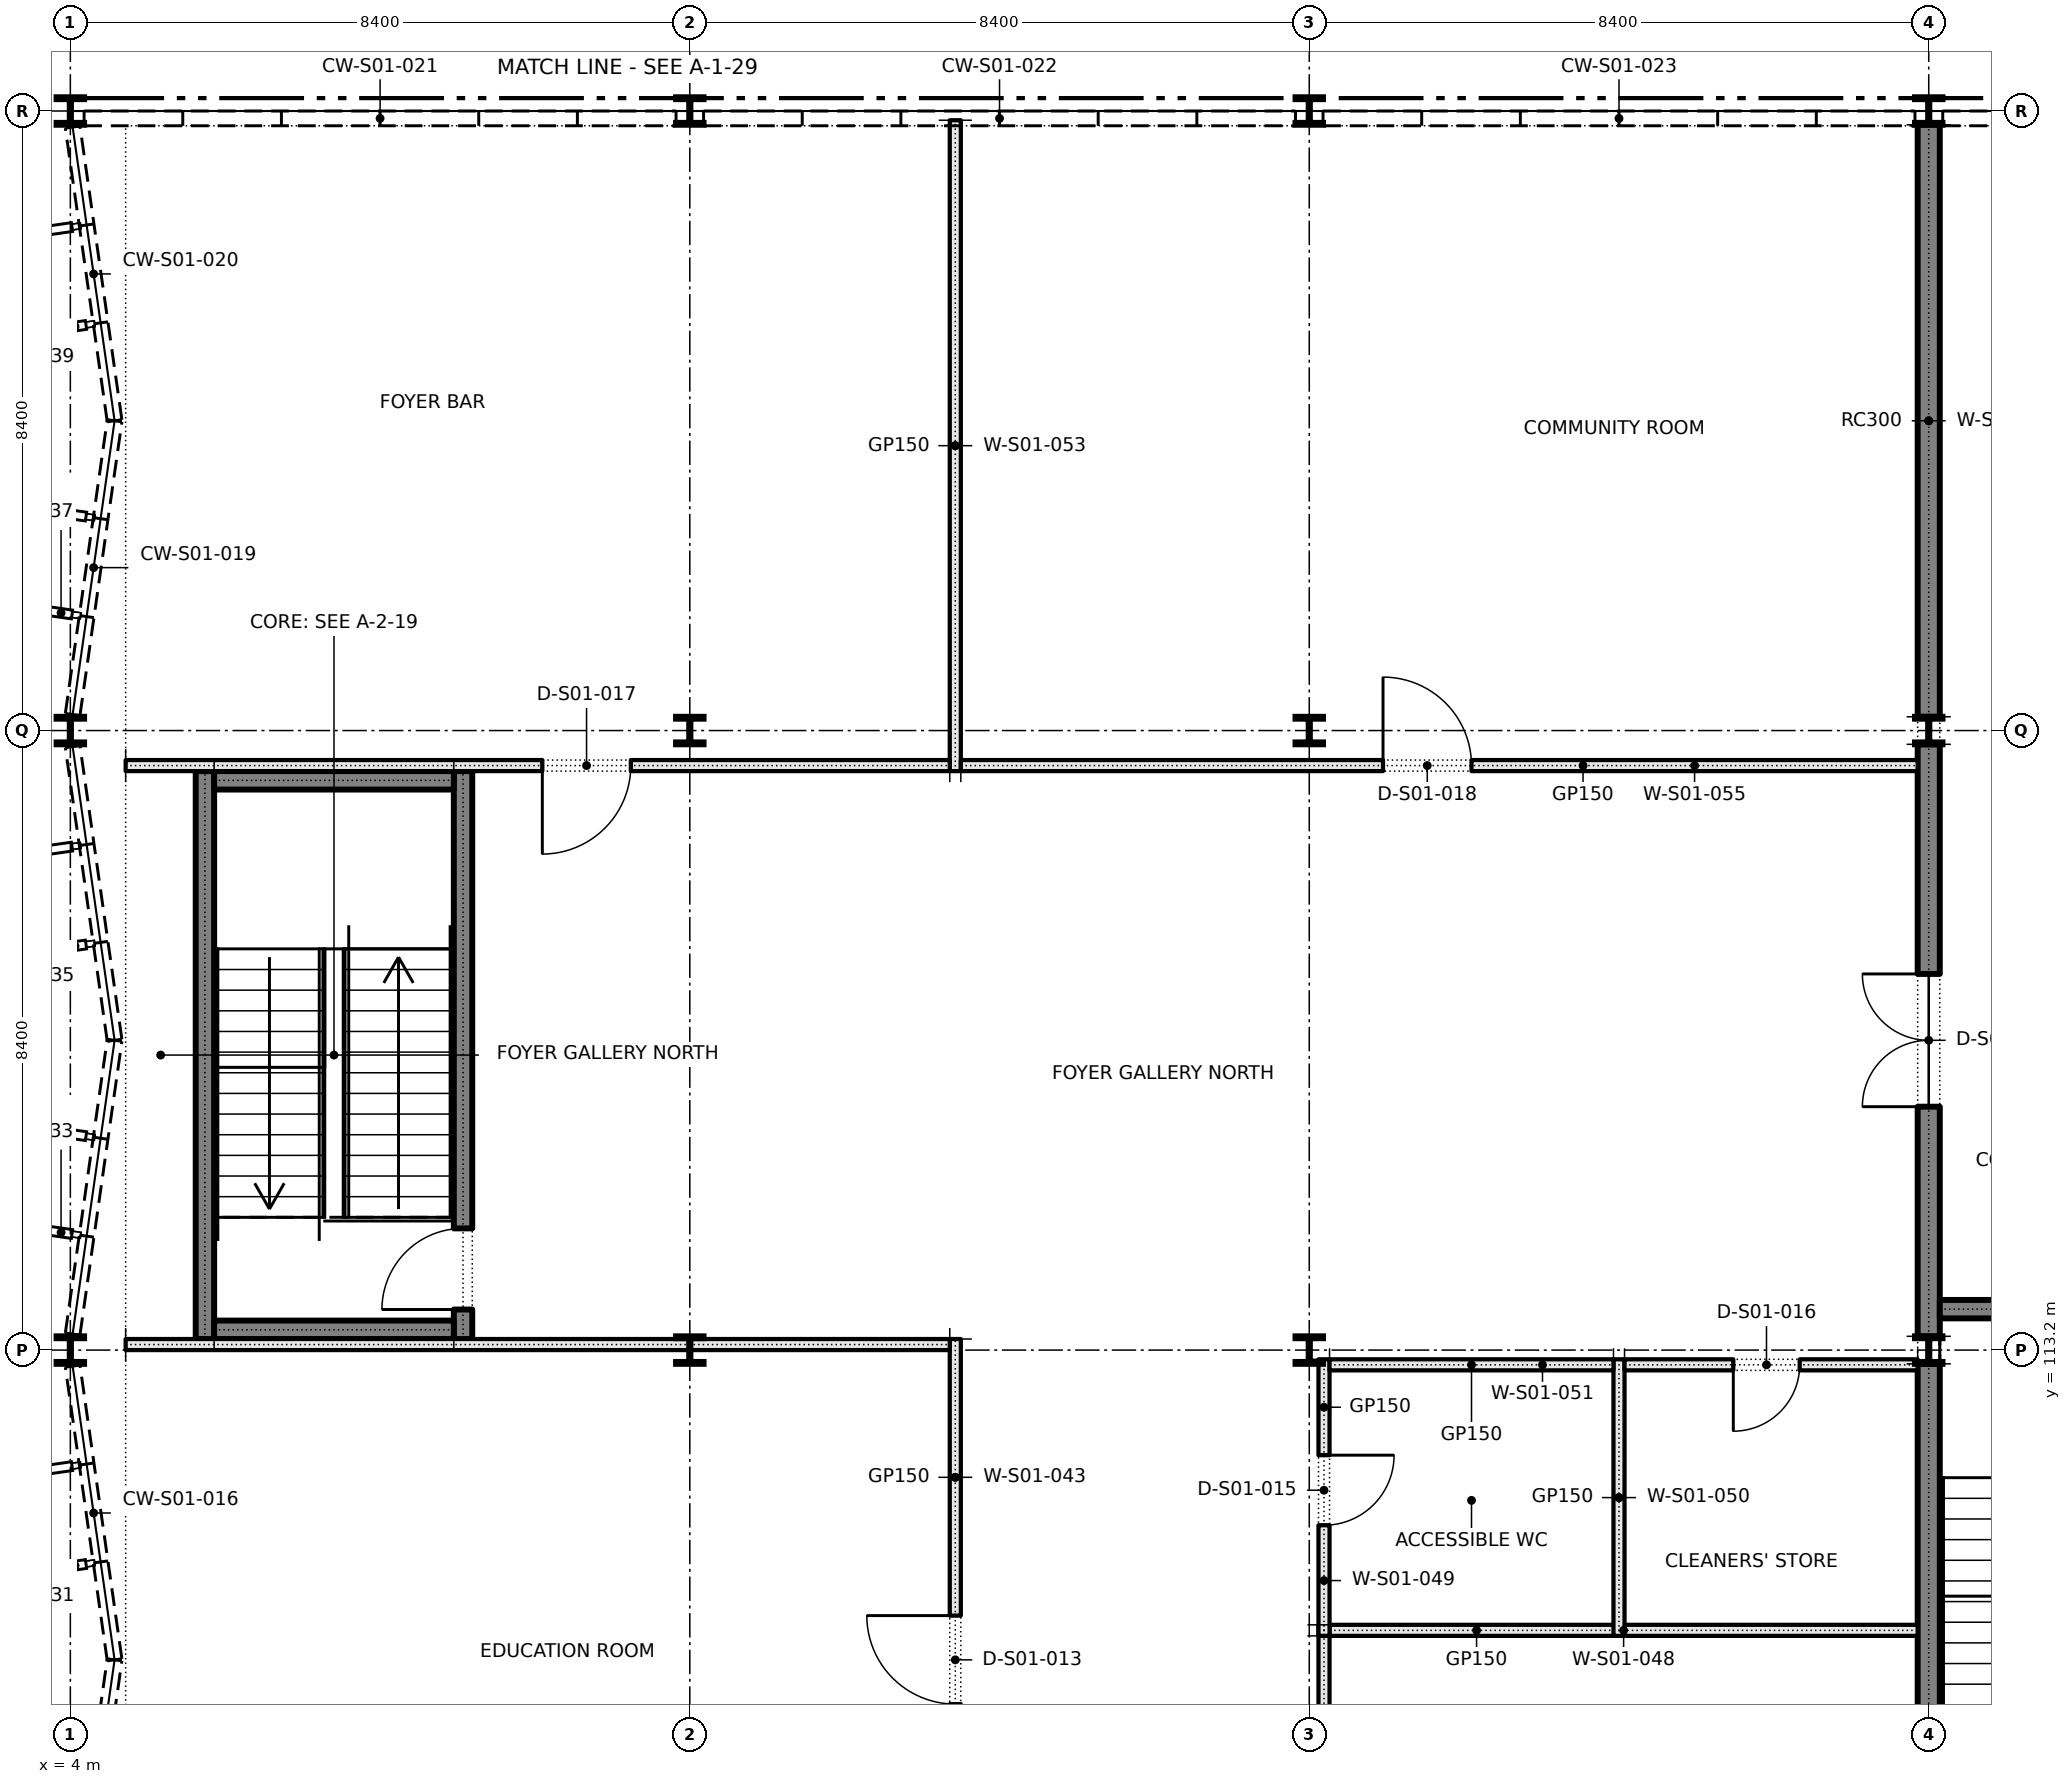
"""IFC4 building model, lengths in metres.
Left out: names, types, materials, properties, quantities, classifications, styles, units other than length and angle.
Written with IfcOpenShell. Run it as: python <this file> out.ifc"""

import sys

from ifc_helpers import new_model, si_unit, direction, frame, frame_2d, origin, origin_2d, place, context, subcontext, project, spatial, rectangle, i_section, extrude, element, fill, save


model = new_model("IFC4")
c1 = context("Model", 3, precision=1e-05, world=origin(), true_north=direction((0.0, 1.0)))
c2 = subcontext(c1, "Body", "Model", "MODEL_VIEW")
j1 = project(units=[si_unit("LENGTHUNIT", "METRE"), si_unit("PLANEANGLEUNIT", "RADIAN")], contexts=[c1])
p1 = place(None, origin())
s1 = spatial("IfcSite", under=j1, at=p1, CompositionType="ELEMENT")
p2 = place(p1, origin())
s2 = spatial("IfcBuilding", under=s1, at=p2, CompositionType="ELEMENT")
p3 = place(p2, frame((0.0, 0.0, 5.4)))
s3 = spatial("IfcBuildingStorey", under=s2, at=p3, CompositionType="ELEMENT", Elevation=5.4)
for number, where, z_axis, x_axis in (
    (1, (4.0, 113.2, 0.0), (0.0, 0.0, 1.0), (1.0, 0.0, 0.0)),
    (2, (4.0, 121.6, 0.0), (0.0, 0.0, 1.0), (1.0, 0.0, 0.0)),
    (3, (12.4, 113.2, 0.0), (0.0, 0.0, 1.0), (1.0, 0.0, 0.0)),
    (4, (12.4, 121.6, 0.0), (0.0, 0.0, 1.0), (1.0, 0.0, 0.0)),
    (5, (20.8, 113.2, 0.0), (0.0, 0.0, 1.0), (1.0, 0.0, 0.0)),
    (6, (20.8, 121.6, 0.0), (0.0, 0.0, 1.0), (1.0, 0.0, 0.0)),
    (7, (29.2, 113.2, 0.0), (0.0, 0.0, 1.0), (1.0, 0.0, 0.0)),
    (8, (29.2, 121.6, 0.0), (0.0, 0.0, 1.0), (1.0, 0.0, 0.0)),
    (9, (4.0, 130.0, 0.0), (0.0, 0.0, 1.0), (1.0, 0.0, 0.0)),
    (10, (12.4, 130.0, 0.0), (0.0, 0.0, 1.0), (1.0, 0.0, 0.0)),
    (11, (20.8, 130.0, 0.0), (0.0, 0.0, 1.0), (1.0, 0.0, 0.0)),
    (12, (29.2, 130.0, 0.0), (0.0, 0.0, 1.0), (1.0, 0.0, 0.0)),
):
    element("IfcColumn", number, at=place(p3, frame(where, z_axis=z_axis, x_axis=x_axis)), inside=s3, PredefinedType="COLUMN", context=c2, shape_type="SweptSolid", body=[
        extrude(i_section(OverallWidth=0.373, OverallDepth=0.373, WebThickness=0.016, FlangeThickness=0.026, FilletRadius=0.015, at=origin_2d()), origin(), (0.0, 0.0, 1.0), 4.8),
    ])
p4 = place(p3, frame((29.2, 104.987, 0.0), z_axis=(0.0, 0.0, 1.0), x_axis=(0.0, 1.0, 0.0)))
e13 = element("IfcWall", 13, at=p4, inside=s3, PredefinedType="SOLIDWALL", context=c2, shape_type="SweptSolid", body=[
    extrude(rectangle(XDim=8.027, YDim=0.3, at=frame_2d((4.013, 0.0))), origin(), (0.0, 0.0, 1.0), 4.8),
])
p5 = place(p3, frame((29.2, 113.387, 0.0), z_axis=(0.0, 0.0, 1.0), x_axis=(0.0, 1.0, 0.0)))
e14 = element("IfcWall", 14, at=p5, inside=s3, PredefinedType="SOLIDWALL", context=c2, shape_type="SweptSolid", body=[
    extrude(rectangle(XDim=8.027, YDim=0.3, at=frame_2d((4.013, 0.0))), origin(), (0.0, 0.0, 1.0), 4.8),
])
p6 = place(p5, frame((3.113, 0.0, 0.0)))
e15 = element("IfcOpeningElement", 15, at=p6, cuts=e14, PredefinedType="OPENING", context=c2, shape_type="SweptSolid", body=[
    extrude(rectangle(XDim=1.8, YDim=2.4, at=frame_2d((0.9, 1.2))), frame((0.0, 0.16, 0.0), z_axis=(0.0, -1.0, 0.0), x_axis=(1.0, 0.0, 0.0)), (0.0, 0.0, 1.0), 0.32),
])
p7 = place(p3, frame((29.2, 121.787, 0.0), z_axis=(0.0, 0.0, 1.0), x_axis=(0.0, 1.0, 0.0)))
e16 = element("IfcWall", 16, at=p7, inside=s3, PredefinedType="SOLIDWALL", context=c2, shape_type="SweptSolid", body=[
    extrude(rectangle(XDim=8.027, YDim=0.3, at=frame_2d((4.013, 0.0))), origin(), (0.0, 0.0, 1.0), 4.8),
])
p8 = place(p3, frame((5.825, 113.35, 0.0), z_axis=(0.0, 0.0, 1.0), x_axis=(0.0, 1.0, 0.0)))
e17 = element("IfcWall", 17, at=p8, inside=s3, PredefinedType="SHEAR", context=c2, shape_type="SweptSolid", body=[
    extrude(rectangle(XDim=7.7, YDim=0.25, at=frame_2d((3.85, 0.0))), origin(), (0.0, 0.0, 1.0), 4.8),
])
p9 = place(p3, frame((9.325, 113.35, 0.0), z_axis=(0.0, 0.0, 1.0), x_axis=(0.0, 1.0, 0.0)))
e18 = element("IfcWall", 18, at=p9, inside=s3, PredefinedType="SHEAR", context=c2, shape_type="SweptSolid", body=[
    extrude(rectangle(XDim=7.7, YDim=0.25, at=frame_2d((3.85, 0.0))), origin(), (0.0, 0.0, 1.0), 4.8),
])
p10 = place(p9, frame((0.4, 0.0, 0.0)))
e19 = element("IfcOpeningElement", 19, at=p10, cuts=e18, PredefinedType="OPENING", context=c2, shape_type="SweptSolid", body=[
    extrude(rectangle(XDim=1.1, YDim=2.1, at=frame_2d((0.55, 1.05))), frame((0.0, 0.135, 0.0), z_axis=(0.0, -1.0, 0.0), x_axis=(1.0, 0.0, 0.0)), (0.0, 0.0, 1.0), 0.27),
])
for number, where, z_axis, x_axis in (
    (20, (5.95, 120.925, 0.0), (0.0, 0.0, 1.0), (1.0, 0.0, 0.0)),
    (21, (5.95, 113.475, 0.0), (0.0, 0.0, 1.0), (1.0, 0.0, 0.0)),
):
    element("IfcWall", number, at=place(p3, frame(where, z_axis=z_axis, x_axis=x_axis)), inside=s3, PredefinedType="SHEAR", context=c2, shape_type="SweptSolid", body=[
        extrude(rectangle(XDim=3.25, YDim=0.25, at=frame_2d((1.625, 0.0))), origin(), (0.0, 0.0, 1.0), 4.8),
    ])
p11 = place(p3, frame((16.0, 104.925, 0.0), z_axis=(0.0, 0.0, 1.0), x_axis=(0.0, 1.0, 0.0)))
e22 = element("IfcWall", 22, at=p11, inside=s3, PredefinedType="PARTITIONING", context=c2, shape_type="SweptSolid", body=[
    extrude(rectangle(XDim=8.425, YDim=0.15, at=frame_2d((4.212, 0.0))), origin(), (0.0, 0.0, 1.0), 4.8),
])
p12 = place(p11, frame((3.475, 0.0, 0.0)))
e23 = element("IfcOpeningElement", 23, at=p12, cuts=e22, PredefinedType="OPENING", context=c2, shape_type="SweptSolid", body=[
    extrude(rectangle(XDim=1.2, YDim=2.1, at=frame_2d((0.6, 1.05))), frame((0.0, 0.085, 0.0), z_axis=(0.0, -1.0, 0.0), x_axis=(1.0, 0.0, 0.0)), (0.0, 0.0, 1.0), 0.17),
])
p13 = place(p3, frame((4.75, 113.275, 0.0), z_axis=(0.0, 0.0, 1.0), x_axis=(1.0, 0.0, 0.0)))
e24 = element("IfcWall", 24, at=p13, inside=s3, PredefinedType="PARTITIONING", context=c2, shape_type="SweptSolid", body=[
    extrude(rectangle(XDim=11.175, YDim=0.15, at=frame_2d((5.587, 0.0))), origin(), (0.0, 0.0, 1.0), 4.008),
])
p14 = place(p3, frame((21.0, 104.925, 0.0), z_axis=(0.0, 0.0, 1.0), x_axis=(0.0, 1.0, 0.0)))
e25 = element("IfcWall", 25, at=p14, inside=s3, PredefinedType="PARTITIONING", context=c2, shape_type="SweptSolid", body=[
    extrude(rectangle(XDim=4.55, YDim=0.15, at=frame_2d((2.275, 0.0))), origin(), (0.0, 0.0, 1.0), 4.8),
])
p15 = place(p14, frame((1.825, 0.0, 0.0)))
e26 = element("IfcOpeningElement", 26, at=p15, cuts=e25, PredefinedType="OPENING", context=c2, shape_type="SweptSolid", body=[
    extrude(rectangle(XDim=0.9, YDim=2.1, at=frame_2d((0.45, 1.05))), frame((0.0, 0.085, 0.0), z_axis=(0.0, -1.0, 0.0), x_axis=(1.0, 0.0, 0.0)), (0.0, 0.0, 1.0), 0.17),
])
p16 = place(p3, frame((21.075, 109.4, 0.0), z_axis=(0.0, 0.0, 1.0), x_axis=(1.0, 0.0, 0.0)))
e27 = element("IfcWall", 27, at=p16, inside=s3, PredefinedType="PARTITIONING", context=c2, shape_type="SweptSolid", body=[
    extrude(rectangle(XDim=7.975, YDim=0.15, at=frame_2d((3.988, 0.0))), origin(), (0.0, 0.0, 1.0), 4.8),
])
p17 = place(p3, frame((21.0, 109.325, 0.0), z_axis=(0.0, 0.0, 1.0), x_axis=(0.0, 1.0, 0.0)))
e28 = element("IfcWall", 28, at=p17, inside=s3, PredefinedType="PARTITIONING", context=c2, shape_type="SweptSolid", body=[
    extrude(rectangle(XDim=3.75, YDim=0.15, at=frame_2d((1.875, 0.0))), origin(), (0.0, 0.0, 1.0), 4.8),
])
p18 = place(p17, frame((1.5, 0.0, 0.0)))
e29 = element("IfcOpeningElement", 29, at=p18, cuts=e28, PredefinedType="OPENING", context=c2, shape_type="SweptSolid", body=[
    extrude(rectangle(XDim=0.95, YDim=2.1, at=frame_2d((0.475, 1.05))), frame((0.0, 0.085, 0.0), z_axis=(0.0, -1.0, 0.0), x_axis=(1.0, 0.0, 0.0)), (0.0, 0.0, 1.0), 0.17),
])
p19 = place(p3, frame((25.0, 109.325, 0.0), z_axis=(0.0, 0.0, 1.0), x_axis=(0.0, 1.0, 0.0)))
e30 = element("IfcWall", 30, at=p19, inside=s3, PredefinedType="PARTITIONING", context=c2, shape_type="SweptSolid", body=[
    extrude(rectangle(XDim=3.75, YDim=0.15, at=frame_2d((1.875, 0.0))), origin(), (0.0, 0.0, 1.0), 4.8),
])
p20 = place(p3, frame((21.075, 113.0, 0.0), z_axis=(0.0, 0.0, 1.0), x_axis=(1.0, 0.0, 0.0)))
e31 = element("IfcWall", 31, at=p20, inside=s3, PredefinedType="PARTITIONING", context=c2, shape_type="SweptSolid", body=[
    extrude(rectangle(XDim=3.85, YDim=0.15, at=frame_2d((1.925, 0.0))), origin(), (0.0, 0.0, 1.0), 4.8),
])
p21 = place(p3, frame((25.075, 113.0, 0.0), z_axis=(0.0, 0.0, 1.0), x_axis=(1.0, 0.0, 0.0)))
e32 = element("IfcWall", 32, at=p21, inside=s3, PredefinedType="PARTITIONING", context=c2, shape_type="SweptSolid", body=[
    extrude(rectangle(XDim=3.975, YDim=0.15, at=frame_2d((1.988, 0.0))), origin(), (0.0, 0.0, 1.0), 4.8),
])
p22 = place(p21, frame((1.475, 0.0, 0.0)))
e33 = element("IfcOpeningElement", 33, at=p22, cuts=e32, PredefinedType="OPENING", context=c2, shape_type="SweptSolid", body=[
    extrude(rectangle(XDim=0.9, YDim=2.1, at=frame_2d((0.45, 1.05))), frame((0.0, 0.085, 0.0), z_axis=(0.0, -1.0, 0.0), x_axis=(1.0, 0.0, 0.0)), (0.0, 0.0, 1.0), 0.17),
])
p23 = place(p3, frame((16.0, 121.05, 0.0), z_axis=(0.0, 0.0, 1.0), x_axis=(0.0, 1.0, 0.0)))
e34 = element("IfcWall", 34, at=p23, inside=s3, PredefinedType="PARTITIONING", context=c2, shape_type="SweptSolid", body=[
    extrude(rectangle(XDim=8.825, YDim=0.15, at=frame_2d((4.413, 0.0))), origin(), (0.0, 0.0, 1.0), 4.8),
])
p24 = place(p3, frame((4.75, 121.125, 0.0), z_axis=(0.0, 0.0, 1.0), x_axis=(1.0, 0.0, 0.0)))
e35 = element("IfcWall", 35, at=p24, inside=s3, PredefinedType="PARTITIONING", context=c2, shape_type="SweptSolid", body=[
    extrude(rectangle(XDim=11.175, YDim=0.15, at=frame_2d((5.587, 0.0))), origin(), (0.0, 0.0, 1.0), 4.8),
])
p25 = place(p24, frame((5.65, 0.0, 0.0)))
e36 = element("IfcOpeningElement", 36, at=p25, cuts=e35, PredefinedType="OPENING", context=c2, shape_type="SweptSolid", body=[
    extrude(rectangle(XDim=1.2, YDim=2.1, at=frame_2d((0.6, 1.05))), frame((0.0, 0.085, 0.0), z_axis=(0.0, -1.0, 0.0), x_axis=(1.0, 0.0, 0.0)), (0.0, 0.0, 1.0), 0.17),
])
p26 = place(p3, frame((16.075, 121.125, 0.0), z_axis=(0.0, 0.0, 1.0), x_axis=(1.0, 0.0, 0.0)))
e37 = element("IfcWall", 37, at=p26, inside=s3, PredefinedType="PARTITIONING", context=c2, shape_type="SweptSolid", body=[
    extrude(rectangle(XDim=12.975, YDim=0.15, at=frame_2d((6.488, 0.0))), origin(), (0.0, 0.0, 1.0), 4.8),
])
p27 = place(p26, frame((5.725, 0.0, 0.0)))
e38 = element("IfcOpeningElement", 38, at=p27, cuts=e37, PredefinedType="OPENING", context=c2, shape_type="SweptSolid", body=[
    extrude(rectangle(XDim=1.2, YDim=2.1, at=frame_2d((0.6, 1.05))), frame((0.0, 0.085, 0.0), z_axis=(0.0, -1.0, 0.0), x_axis=(1.0, 0.0, 0.0)), (0.0, 0.0, 1.0), 0.17),
])
p28 = place(p3, frame((29.35, 113.755, 0.0), z_axis=(0.0, 0.0, 1.0), x_axis=(1.0, 0.0, 0.0)))
e39 = element("IfcWall", 39, at=p28, inside=s3, PredefinedType="SHEAR", context=c2, shape_type="SweptSolid", body=[
    extrude(rectangle(XDim=3.25, YDim=0.25, at=frame_2d((1.625, 0.0))), origin(), (0.0, 0.0, 1.0), 4.8),
])
p29 = place(p6, origin())
e40 = element("IfcDoor", 40, at=p29, inside=s3, OperationType="DOUBLE_DOOR_SINGLE_SWING", PredefinedType="DOOR", context=c2, shape_type="SweptSolid", body=[
    extrude(rectangle(XDim=1.8, YDim=2.4, at=frame_2d((0.9, 1.2))), frame((0.0, 0.025, 0.0), z_axis=(0.0, -1.0, 0.0), x_axis=(1.0, 0.0, 0.0)), (0.0, 0.0, 1.0), 0.05),
])
fill(e15, e40)
p30 = place(p10, origin())
e41 = element("IfcDoor", 41, at=p30, inside=s3, OperationType="SINGLE_SWING_LEFT", PredefinedType="DOOR", context=c2, shape_type="SweptSolid", body=[
    extrude(rectangle(XDim=1.1, YDim=2.1, at=frame_2d((0.55, 1.05))), frame((0.0, 0.025, 0.0), z_axis=(0.0, -1.0, 0.0), x_axis=(1.0, 0.0, 0.0)), (0.0, 0.0, 1.0), 0.05),
])
fill(e19, e41)
p31 = place(p12, origin())
e42 = element("IfcDoor", 42, at=p31, inside=s3, OperationType="SINGLE_SWING_RIGHT", PredefinedType="DOOR", context=c2, shape_type="SweptSolid", body=[
    extrude(rectangle(XDim=1.2, YDim=2.1, at=frame_2d((0.6, 1.05))), frame((0.0, 0.025, 0.0), z_axis=(0.0, -1.0, 0.0), x_axis=(1.0, 0.0, 0.0)), (0.0, 0.0, 1.0), 0.05),
])
fill(e23, e42)
p32 = place(p18, frame((0.95, 0.0, 0.0), z_axis=(0.0, 0.0, 1.0), x_axis=(-1.0, 0.0, 0.0)))
e43 = element("IfcDoor", 43, at=p32, inside=s3, OperationType="SINGLE_SWING_LEFT", PredefinedType="DOOR", context=c2, shape_type="SweptSolid", body=[
    extrude(rectangle(XDim=0.95, YDim=2.1, at=frame_2d((0.475, 1.05))), frame((0.0, 0.025, 0.0), z_axis=(0.0, -1.0, 0.0), x_axis=(1.0, 0.0, 0.0)), (0.0, 0.0, 1.0), 0.05),
])
fill(e29, e43)
p33 = place(p22, frame((0.9, 0.0, 0.0), z_axis=(0.0, 0.0, 1.0), x_axis=(-1.0, 0.0, 0.0)))
e44 = element("IfcDoor", 44, at=p33, inside=s3, OperationType="SINGLE_SWING_RIGHT", PredefinedType="DOOR", context=c2, shape_type="SweptSolid", body=[
    extrude(rectangle(XDim=0.9, YDim=2.1, at=frame_2d((0.45, 1.05))), frame((0.0, 0.025, 0.0), z_axis=(0.0, -1.0, 0.0), x_axis=(1.0, 0.0, 0.0)), (0.0, 0.0, 1.0), 0.05),
])
fill(e33, e44)
p34 = place(p25, frame((1.2, 0.0, 0.0), z_axis=(0.0, 0.0, 1.0), x_axis=(-1.0, 0.0, 0.0)))
e45 = element("IfcDoor", 45, at=p34, inside=s3, OperationType="SINGLE_SWING_RIGHT", PredefinedType="DOOR", context=c2, shape_type="SweptSolid", body=[
    extrude(rectangle(XDim=1.2, YDim=2.1, at=frame_2d((0.6, 1.05))), frame((0.0, 0.025, 0.0), z_axis=(0.0, -1.0, 0.0), x_axis=(1.0, 0.0, 0.0)), (0.0, 0.0, 1.0), 0.05),
])
fill(e36, e45)
p35 = place(p27, origin())
e46 = element("IfcDoor", 46, at=p35, inside=s3, OperationType="SINGLE_SWING_LEFT", PredefinedType="DOOR", context=c2, shape_type="SweptSolid", body=[
    extrude(rectangle(XDim=1.2, YDim=2.1, at=frame_2d((0.6, 1.05))), frame((0.0, 0.025, 0.0), z_axis=(0.0, -1.0, 0.0), x_axis=(1.0, 0.0, 0.0)), (0.0, 0.0, 1.0), 0.05),
])
fill(e38, e46)
save(model, sys.argv[1])
